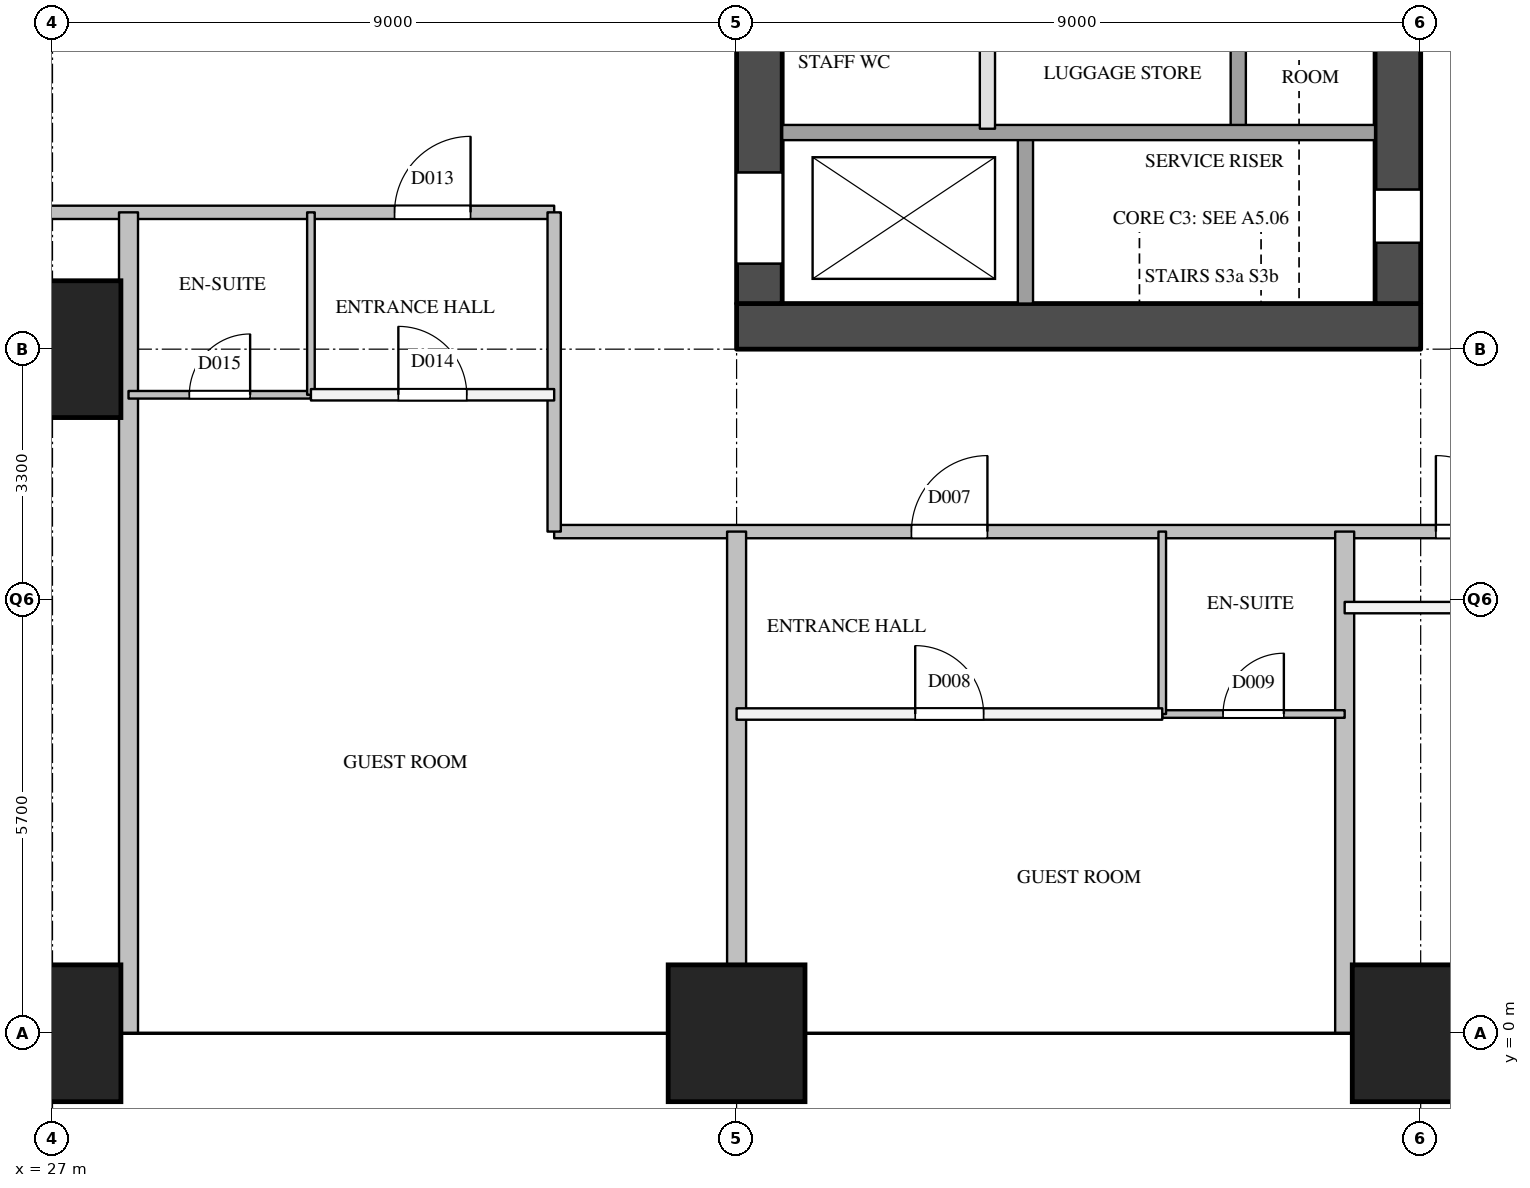
"""IFC4 building model, lengths in metres.
Left out: names, types, materials, properties, quantities, classifications, styles, units other than length and angle.
Written with IfcOpenShell. Run it as: python <this file> out.ifc"""

import sys

from ifc_helpers import new_model, si_unit, direction, frame, frame_2d, origin, origin_2d, place, context, subcontext, project, spatial, rectangle, extrude, element, fill, save


model = new_model("IFC4")
c1 = context("Model", 3, precision=1e-05, world=origin(), true_north=direction((0.0, 1.0)))
c2 = subcontext(c1, "Body", "Model", "MODEL_VIEW")
j1 = project(units=[si_unit("LENGTHUNIT", "METRE"), si_unit("PLANEANGLEUNIT", "RADIAN")], contexts=[c1])
p1 = place(None, origin())
s1 = spatial("IfcSite", under=j1, at=p1, CompositionType="ELEMENT")
p2 = place(p1, origin())
s2 = spatial("IfcBuilding", under=s1, at=p2, CompositionType="ELEMENT")
p3 = place(p2, frame((0.0, 0.0, 38.6)))
s3 = spatial("IfcBuildingStorey", under=s2, at=p3, CompositionType="ELEMENT", Elevation=38.6)
for number, where, z_axis, x_axis in (
    (1, (27.0, 0.0, 0.0), (0.0, 0.0, 1.0), (1.0, 0.0, 0.0)),
    (2, (27.0, 9.0, 0.0), (0.0, 0.0, 1.0), (1.0, 0.0, 0.0)),
    (3, (36.0, 0.0, 0.0), (0.0, 0.0, 1.0), (1.0, 0.0, 0.0)),
    (4, (45.0, 0.0, 0.0), (0.0, 0.0, 1.0), (1.0, 0.0, 0.0)),
):
    element("IfcColumn", number, at=place(p3, frame(where, z_axis=z_axis, x_axis=x_axis)), inside=s3, PredefinedType="COLUMN", context=c2, shape_type="SweptSolid", body=[
        extrude(rectangle(XDim=1.8, YDim=1.8, at=origin_2d()), origin(), (0.0, 0.0, 1.0), 3.8),
    ])
p4 = place(p3, frame((36.0, 9.3, 0.0), z_axis=(0.0, 0.0, 1.0), x_axis=(1.0, 0.0, 0.0)))
e5 = element("IfcWall", 5, at=p4, inside=s3, PredefinedType="SHEAR", context=c2, shape_type="SweptSolid", body=[
    extrude(rectangle(XDim=9.0, YDim=0.6, at=frame_2d((4.5, 0.0))), origin(), (0.0, 0.0, 1.0), 3.5),
])
p5 = place(p3, frame((36.3, 9.6, 0.0), z_axis=(0.0, 0.0, 1.0), x_axis=(0.0, 1.0, 0.0)))
e6 = element("IfcWall", 6, at=p5, inside=s3, PredefinedType="SHEAR", context=c2, shape_type="SweptSolid", body=[
    extrude(rectangle(XDim=12.3, YDim=0.6, at=frame_2d((6.15, 0.0))), origin(), (0.0, 0.0, 1.0), 3.5),
])
p6 = place(p5, frame((0.525, 0.0, 0.0)))
e7 = element("IfcOpeningElement", 7, at=p6, cuts=e6, PredefinedType="OPENING", context=c2, shape_type="SweptSolid", body=[
    extrude(rectangle(XDim=1.2, YDim=2.1, at=frame_2d((0.6, 1.05))), frame((0.0, 0.31, 0.0), z_axis=(0.0, -1.0, 0.0), x_axis=(1.0, 0.0, 0.0)), (0.0, 0.0, 1.0), 0.62),
])
p7 = place(p5, frame((4.8, 0.0, 0.0)))
e8 = element("IfcOpeningElement", 8, at=p7, cuts=e6, PredefinedType="OPENING", context=c2, shape_type="SweptSolid", body=[
    extrude(rectangle(XDim=1.0, YDim=2.1, at=frame_2d((0.5, 1.05))), frame((0.0, 0.31, 0.0), z_axis=(0.0, -1.0, 0.0), x_axis=(1.0, 0.0, 0.0)), (0.0, 0.0, 1.0), 0.62),
])
p8 = place(p3, frame((44.7, 9.6, 0.0), z_axis=(0.0, 0.0, 1.0), x_axis=(0.0, 1.0, 0.0)))
e9 = element("IfcWall", 9, at=p8, inside=s3, PredefinedType="SHEAR", context=c2, shape_type="SweptSolid", body=[
    extrude(rectangle(XDim=12.3, YDim=0.6, at=frame_2d((6.15, 0.0))), origin(), (0.0, 0.0, 1.0), 3.5),
])
p9 = place(p8, frame((0.8, 0.0, 0.0)))
e10 = element("IfcOpeningElement", 10, at=p9, cuts=e9, PredefinedType="OPENING", context=c2, shape_type="SweptSolid", body=[
    extrude(rectangle(XDim=0.7, YDim=2.1, at=frame_2d((0.35, 1.05))), frame((0.0, 0.31, 0.0), z_axis=(0.0, -1.0, 0.0), x_axis=(1.0, 0.0, 0.0)), (0.0, 0.0, 1.0), 0.62),
])
p10 = place(p3, frame((39.3, 11.9, 0.0), z_axis=(0.0, 0.0, 1.0), x_axis=(0.0, 1.0, 0.0)))
e11 = element("IfcWall", 11, at=p10, inside=s3, PredefinedType="PARTITIONING", context=c2, shape_type="SweptSolid", body=[
    extrude(rectangle(XDim=2.2, YDim=0.2, at=frame_2d((1.1, 0.0))), origin(), (0.0, 0.0, 1.0), 3.5),
])
p11 = place(p3, frame((39.8, 9.6, 0.0), z_axis=(0.0, 0.0, 1.0), x_axis=(0.0, 1.0, 0.0)))
e12 = element("IfcWall", 12, at=p11, inside=s3, PredefinedType="SOLIDWALL", context=c2, shape_type="SweptSolid", body=[
    extrude(rectangle(XDim=2.3, YDim=0.2, at=frame_2d((1.15, 0.0))), origin(), (0.0, 0.0, 1.0), 3.5),
])
p12 = place(p3, frame((42.6, 11.9, 0.0), z_axis=(0.0, 0.0, 1.0), x_axis=(0.0, 1.0, 0.0)))
e13 = element("IfcWall", 13, at=p12, inside=s3, PredefinedType="SOLIDWALL", context=c2, shape_type="SweptSolid", body=[
    extrude(rectangle(XDim=2.2, YDim=0.2, at=frame_2d((1.1, 0.0))), origin(), (0.0, 0.0, 1.0), 3.5),
])
p13 = place(p3, frame((36.6, 11.85, 0.0), z_axis=(0.0, 0.0, 1.0), x_axis=(1.0, 0.0, 0.0)))
e14 = element("IfcWall", 14, at=p13, inside=s3, PredefinedType="SOLIDWALL", context=c2, shape_type="SweptSolid", body=[
    extrude(rectangle(XDim=7.8, YDim=0.2, at=frame_2d((3.9, 0.0))), origin(), (0.0, 0.0, 1.0), 3.5),
])
p14 = place(p3, frame((33.6, 6.6, 0.0), z_axis=(0.0, 0.0, 1.0), x_axis=(1.0, 0.0, 0.0)))
e15 = element("IfcWall", 15, at=p14, inside=s3, PredefinedType="PARTITIONING", context=c2, shape_type="SweptSolid", body=[
    extrude(rectangle(XDim=13.8, YDim=0.175, at=frame_2d((6.9, 0.0))), origin(), (0.0, 0.0, 1.0), 3.5),
])
p15 = place(p14, frame((4.7, 0.0, 0.0)))
e16 = element("IfcOpeningElement", 16, at=p15, cuts=e15, PredefinedType="OPENING", context=c2, shape_type="SweptSolid", body=[
    extrude(rectangle(XDim=1.0, YDim=2.1, at=frame_2d((0.5, 1.05))), frame((0.0, 0.097, 0.0), z_axis=(0.0, -1.0, 0.0), x_axis=(1.0, 0.0, 0.0)), (0.0, 0.0, 1.0), 0.195),
])
p16 = place(p14, frame((11.6, 0.0, 0.0)))
e17 = element("IfcOpeningElement", 17, at=p16, cuts=e15, PredefinedType="OPENING", context=c2, shape_type="SweptSolid", body=[
    extrude(rectangle(XDim=1.0, YDim=2.1, at=frame_2d((0.5, 1.05))), frame((0.0, 0.097, 0.0), z_axis=(0.0, -1.0, 0.0), x_axis=(1.0, 0.0, 0.0)), (0.0, 0.0, 1.0), 0.195),
])
p17 = place(p3, frame((20.4, 10.8, 0.0), z_axis=(0.0, 0.0, 1.0), x_axis=(1.0, 0.0, 0.0)))
e18 = element("IfcWall", 18, at=p17, inside=s3, PredefinedType="PARTITIONING", context=c2, shape_type="SweptSolid", body=[
    extrude(rectangle(XDim=13.2, YDim=0.175, at=frame_2d((6.6, 0.0))), origin(), (0.0, 0.0, 1.0), 2.5),
])
p18 = place(p17, frame((11.1, 0.0, 0.0)))
e19 = element("IfcOpeningElement", 19, at=p18, cuts=e18, PredefinedType="OPENING", context=c2, shape_type="SweptSolid", body=[
    extrude(rectangle(XDim=1.0, YDim=2.1, at=frame_2d((0.5, 1.05))), frame((0.0, 0.097, 0.0), z_axis=(0.0, -1.0, 0.0), x_axis=(1.0, 0.0, 0.0)), (0.0, 0.0, 1.0), 0.195),
])
p19 = place(p17, frame((3.35, 0.0, 0.0)))
e20 = element("IfcOpeningElement", 20, at=p19, cuts=e18, PredefinedType="OPENING", context=c2, shape_type="SweptSolid", body=[
    extrude(rectangle(XDim=0.9, YDim=2.1, at=frame_2d((0.45, 1.05))), frame((0.0, 0.097, 0.0), z_axis=(0.0, -1.0, 0.0), x_axis=(1.0, 0.0, 0.0)), (0.0, 0.0, 1.0), 0.195),
])
p20 = place(p3, frame((33.6, 6.6, 0.0), z_axis=(0.0, 0.0, 1.0), x_axis=(0.0, 1.0, 0.0)))
e21 = element("IfcWall", 21, at=p20, inside=s3, PredefinedType="PARTITIONING", context=c2, shape_type="SweptSolid", body=[
    extrude(rectangle(XDim=4.2, YDim=0.175, at=frame_2d((2.1, 0.0))), origin(), (0.0, 0.0, 1.0), 3.5),
])
p21 = place(p3, frame((36.0, 4.2, 0.0), z_axis=(0.0, 0.0, 1.0), x_axis=(1.0, 0.0, 0.0)))
e22 = element("IfcWall", 22, at=p21, inside=s3, PredefinedType="PARTITIONING", context=c2, shape_type="SweptSolid", body=[
    extrude(rectangle(XDim=5.6, YDim=0.15, at=frame_2d((2.8, 0.0))), origin(), (0.0, 0.0, 1.0), 3.5),
])
p22 = place(p21, frame((2.35, 0.0, 0.0)))
e23 = element("IfcOpeningElement", 23, at=p22, cuts=e22, PredefinedType="OPENING", context=c2, shape_type="SweptSolid", body=[
    extrude(rectangle(XDim=0.9, YDim=2.1, at=frame_2d((0.45, 1.05))), frame((0.0, 0.085, 0.0), z_axis=(0.0, -1.0, 0.0), x_axis=(1.0, 0.0, 0.0)), (0.0, 0.0, 1.0), 0.17),
])
p23 = place(p3, frame((44.0, 5.6, 0.0), z_axis=(0.0, 0.0, 1.0), x_axis=(1.0, 0.0, 0.0)))
e24 = element("IfcWall", 24, at=p23, inside=s3, PredefinedType="PARTITIONING", context=c2, shape_type="SweptSolid", body=[
    extrude(rectangle(XDim=7.6, YDim=0.15, at=frame_2d((3.8, 0.0))), origin(), (0.0, 0.0, 1.0), 3.5),
])
p24 = place(p23, frame((3.35, 0.0, 0.0)))
e25 = element("IfcOpeningElement", 25, at=p24, cuts=e24, PredefinedType="OPENING", context=c2, shape_type="SweptSolid", body=[
    extrude(rectangle(XDim=0.9, YDim=2.1, at=frame_2d((0.45, 1.05))), frame((0.0, 0.085, 0.0), z_axis=(0.0, -1.0, 0.0), x_axis=(1.0, 0.0, 0.0)), (0.0, 0.0, 1.0), 0.17),
])
p25 = place(p3, frame((30.4, 8.4, 0.0), z_axis=(0.0, 0.0, 1.0), x_axis=(1.0, 0.0, 0.0)))
e26 = element("IfcWall", 26, at=p25, inside=s3, PredefinedType="PARTITIONING", context=c2, shape_type="SweptSolid", body=[
    extrude(rectangle(XDim=3.2, YDim=0.15, at=frame_2d((1.6, 0.0))), origin(), (0.0, 0.0, 1.0), 3.5),
])
p26 = place(p25, frame((1.15, 0.0, 0.0)))
e27 = element("IfcOpeningElement", 27, at=p26, cuts=e26, PredefinedType="OPENING", context=c2, shape_type="SweptSolid", body=[
    extrude(rectangle(XDim=0.9, YDim=2.1, at=frame_2d((0.45, 1.05))), frame((0.0, 0.085, 0.0), z_axis=(0.0, -1.0, 0.0), x_axis=(1.0, 0.0, 0.0)), (0.0, 0.0, 1.0), 0.17),
])
p27 = place(p3, frame((28.0, 0.0, 0.0), z_axis=(0.0, 0.0, 1.0), x_axis=(0.0, 1.0, 0.0)))
e28 = element("IfcWall", 28, at=p27, inside=s3, PredefinedType="PARTITIONING", context=c2, shape_type="SweptSolid", body=[
    extrude(rectangle(XDim=10.8, YDim=0.25, at=frame_2d((5.4, 0.0))), origin(), (0.0, 0.0, 1.0), 2.5),
])
p28 = place(p3, frame((36.0, 0.0, 0.0), z_axis=(0.0, 0.0, 1.0), x_axis=(0.0, 1.0, 0.0)))
e29 = element("IfcWall", 29, at=p28, inside=s3, PredefinedType="PARTITIONING", context=c2, shape_type="SweptSolid", body=[
    extrude(rectangle(XDim=6.6, YDim=0.25, at=frame_2d((3.3, 0.0))), origin(), (0.0, 0.0, 1.0), 3.5),
])
p29 = place(p3, frame((44.0, 0.0, 0.0), z_axis=(0.0, 0.0, 1.0), x_axis=(0.0, 1.0, 0.0)))
e30 = element("IfcWall", 30, at=p29, inside=s3, PredefinedType="PARTITIONING", context=c2, shape_type="SweptSolid", body=[
    extrude(rectangle(XDim=6.6, YDim=0.25, at=frame_2d((3.3, 0.0))), origin(), (0.0, 0.0, 1.0), 2.5),
])
p30 = place(p3, frame((41.6, 4.2, 0.0), z_axis=(0.0, 0.0, 1.0), x_axis=(1.0, 0.0, 0.0)))
e31 = element("IfcWall", 31, at=p30, inside=s3, PredefinedType="PARTITIONING", context=c2, shape_type="SweptSolid", body=[
    extrude(rectangle(XDim=2.4, YDim=0.1, at=frame_2d((1.2, 0.0))), origin(), (0.0, 0.0, 1.0), 3.5),
])
p31 = place(p30, frame((0.8, 0.0, 0.0)))
e32 = element("IfcOpeningElement", 32, at=p31, cuts=e31, PredefinedType="OPENING", context=c2, shape_type="SweptSolid", body=[
    extrude(rectangle(XDim=0.8, YDim=2.1, at=frame_2d((0.4, 1.05))), frame((0.0, 0.06, 0.0), z_axis=(0.0, -1.0, 0.0), x_axis=(1.0, 0.0, 0.0)), (0.0, 0.0, 1.0), 0.12),
])
p32 = place(p3, frame((28.0, 8.4, 0.0), z_axis=(0.0, 0.0, 1.0), x_axis=(1.0, 0.0, 0.0)))
e33 = element("IfcWall", 33, at=p32, inside=s3, PredefinedType="PARTITIONING", context=c2, shape_type="SweptSolid", body=[
    extrude(rectangle(XDim=2.4, YDim=0.1, at=frame_2d((1.2, 0.0))), origin(), (0.0, 0.0, 1.0), 3.5),
])
p33 = place(p32, frame((0.8, 0.0, 0.0)))
e34 = element("IfcOpeningElement", 34, at=p33, cuts=e33, PredefinedType="OPENING", context=c2, shape_type="SweptSolid", body=[
    extrude(rectangle(XDim=0.8, YDim=2.1, at=frame_2d((0.4, 1.05))), frame((0.0, 0.06, 0.0), z_axis=(0.0, -1.0, 0.0), x_axis=(1.0, 0.0, 0.0)), (0.0, 0.0, 1.0), 0.12),
])
for number, where, z_axis, x_axis in (
    (35, (30.4, 8.4, 0.0), (0.0, 0.0, 1.0), (0.0, 1.0, 0.0)),
    (36, (41.6, 4.2, 0.0), (0.0, 0.0, 1.0), (0.0, 1.0, 0.0)),
):
    element("IfcWall", number, at=place(p3, frame(where, z_axis=z_axis, x_axis=x_axis)), inside=s3, PredefinedType="PARTITIONING", context=c2, shape_type="SweptSolid", body=[
        extrude(rectangle(XDim=2.4, YDim=0.1, at=frame_2d((1.2, 0.0))), origin(), (0.0, 0.0, 1.0), 3.5),
    ])
p34 = place(p6, origin())
e37 = element("IfcDoor", 37, at=p34, inside=s3, OperationType="SLIDING_TO_LEFT", PredefinedType="DOOR", context=c2, shape_type="SweptSolid", body=[
    extrude(rectangle(XDim=1.2, YDim=2.1, at=frame_2d((0.6, 1.05))), frame((0.0, 0.025, 0.0), z_axis=(0.0, -1.0, 0.0), x_axis=(1.0, 0.0, 0.0)), (0.0, 0.0, 1.0), 0.05),
])
fill(e7, e37)
p35 = place(p9, origin())
e38 = element("IfcDoor", 38, at=p35, inside=s3, OperationType="SINGLE_SWING_LEFT", PredefinedType="DOOR", context=c2, shape_type="SweptSolid", body=[
    extrude(rectangle(XDim=0.7, YDim=2.1, at=frame_2d((0.35, 1.05))), frame((0.0, 0.025, 0.0), z_axis=(0.0, -1.0, 0.0), x_axis=(1.0, 0.0, 0.0)), (0.0, 0.0, 1.0), 0.05),
])
fill(e10, e38)
p36 = place(p15, origin())
e39 = element("IfcDoor", 39, at=p36, inside=s3, OperationType="SINGLE_SWING_RIGHT", PredefinedType="DOOR", context=c2, shape_type="SweptSolid", body=[
    extrude(rectangle(XDim=1.0, YDim=2.1, at=frame_2d((0.5, 1.05))), frame((0.0, 0.025, 0.0), z_axis=(0.0, -1.0, 0.0), x_axis=(1.0, 0.0, 0.0)), (0.0, 0.0, 1.0), 0.05),
])
fill(e16, e39)
p37 = place(p22, origin())
e40 = element("IfcDoor", 40, at=p37, inside=s3, OperationType="SINGLE_SWING_LEFT", PredefinedType="DOOR", context=c2, shape_type="SweptSolid", body=[
    extrude(rectangle(XDim=0.9, YDim=2.1, at=frame_2d((0.45, 1.05))), frame((0.0, 0.025, 0.0), z_axis=(0.0, -1.0, 0.0), x_axis=(1.0, 0.0, 0.0)), (0.0, 0.0, 1.0), 0.05),
])
fill(e23, e40)
p38 = place(p31, origin())
e41 = element("IfcDoor", 41, at=p38, inside=s3, OperationType="SINGLE_SWING_RIGHT", PredefinedType="DOOR", context=c2, shape_type="SweptSolid", body=[
    extrude(rectangle(XDim=0.8, YDim=2.1, at=frame_2d((0.4, 1.05))), frame((0.0, 0.025, 0.0), z_axis=(0.0, -1.0, 0.0), x_axis=(1.0, 0.0, 0.0)), (0.0, 0.0, 1.0), 0.05),
])
fill(e32, e41)
p39 = place(p16, origin())
e42 = element("IfcDoor", 42, at=p39, inside=s3, OperationType="SINGLE_SWING_LEFT", PredefinedType="DOOR", context=c2, shape_type="SweptSolid", body=[
    extrude(rectangle(XDim=1.0, YDim=2.1, at=frame_2d((0.5, 1.05))), frame((0.0, 0.025, 0.0), z_axis=(0.0, -1.0, 0.0), x_axis=(1.0, 0.0, 0.0)), (0.0, 0.0, 1.0), 0.05),
])
fill(e17, e42)
p40 = place(p18, origin())
e43 = element("IfcDoor", 43, at=p40, inside=s3, OperationType="SINGLE_SWING_RIGHT", PredefinedType="DOOR", context=c2, shape_type="SweptSolid", body=[
    extrude(rectangle(XDim=1.0, YDim=2.1, at=frame_2d((0.5, 1.05))), frame((0.0, 0.025, 0.0), z_axis=(0.0, -1.0, 0.0), x_axis=(1.0, 0.0, 0.0)), (0.0, 0.0, 1.0), 0.05),
])
fill(e19, e43)
p41 = place(p26, origin())
e44 = element("IfcDoor", 44, at=p41, inside=s3, OperationType="SINGLE_SWING_LEFT", PredefinedType="DOOR", context=c2, shape_type="SweptSolid", body=[
    extrude(rectangle(XDim=0.9, YDim=2.1, at=frame_2d((0.45, 1.05))), frame((0.0, 0.025, 0.0), z_axis=(0.0, -1.0, 0.0), x_axis=(1.0, 0.0, 0.0)), (0.0, 0.0, 1.0), 0.05),
])
fill(e27, e44)
p42 = place(p33, origin())
e45 = element("IfcDoor", 45, at=p42, inside=s3, OperationType="SINGLE_SWING_RIGHT", PredefinedType="DOOR", context=c2, shape_type="SweptSolid", body=[
    extrude(rectangle(XDim=0.8, YDim=2.1, at=frame_2d((0.4, 1.05))), frame((0.0, 0.025, 0.0), z_axis=(0.0, -1.0, 0.0), x_axis=(1.0, 0.0, 0.0)), (0.0, 0.0, 1.0), 0.05),
])
fill(e34, e45)
save(model, sys.argv[1])
